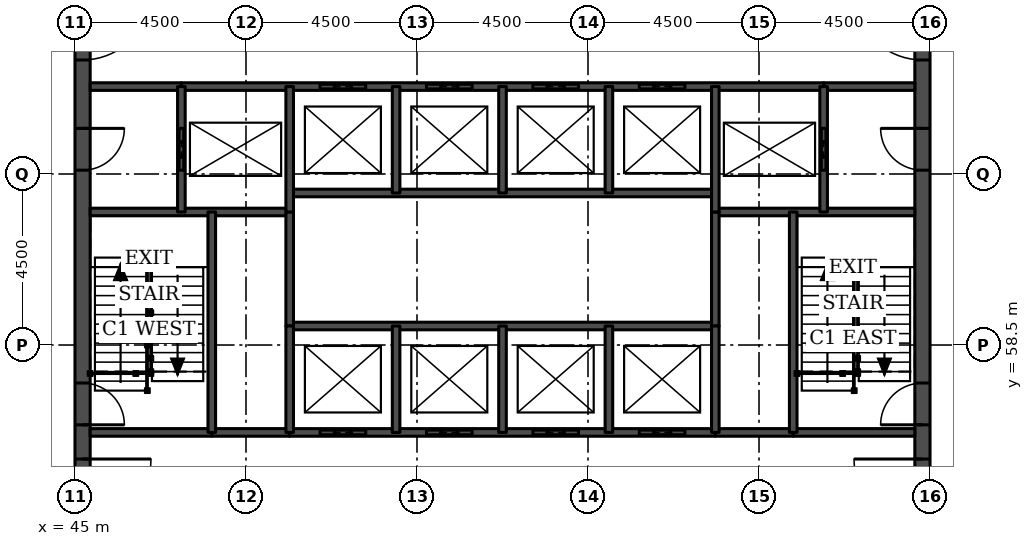
"""IFC4 building model, lengths in metres.
Left out: names, types, materials, properties, quantities, classifications, styles, units other than length and angle.
Written with IfcOpenShell. Run it as: python <this file> out.ifc"""

import sys

from ifc_helpers import new_model, si_unit, direction, frame, frame_2d, origin, place, context, subcontext, project, spatial, rectangle, extrude, element, fill, save


model = new_model("IFC4")
c1 = context("Model", 3, precision=1e-05, world=origin(), true_north=direction((0.0, 1.0)))
c2 = subcontext(c1, "Body", "Model", "MODEL_VIEW")
j1 = project(units=[si_unit("LENGTHUNIT", "METRE"), si_unit("PLANEANGLEUNIT", "RADIAN")], contexts=[c1])
p1 = place(None, origin())
s1 = spatial("IfcSite", under=j1, at=p1, CompositionType="ELEMENT")
p2 = place(p1, origin())
s2 = spatial("IfcBuilding", under=s1, at=p2, CompositionType="ELEMENT")
p3 = place(p2, frame((0.0, 0.0, 223.0)))
s3 = spatial("IfcBuildingStorey", under=s2, at=p3, CompositionType="ELEMENT", Elevation=223.0)
p4 = place(p3, frame((45.2, 49.5, 0.0), z_axis=(0.0, 0.0, 1.0), x_axis=(0.0, 1.0, 0.0)))
e1 = element("IfcWall", 1, at=p4, inside=s3, PredefinedType="SHEAR", context=c2, shape_type="SweptSolid", body=[
    extrude(rectangle(XDim=22.5, YDim=0.4, at=frame_2d((11.25, 0.0))), origin(), (0.0, 0.0, 1.0), 3.7),
])
p5 = place(p4, frame((4.2, 0.0, 0.0)))
e2 = element("IfcOpeningElement", 2, at=p5, cuts=e1, PredefinedType="OPENING", context=c2, shape_type="SweptSolid", body=[
    extrude(rectangle(XDim=1.8, YDim=2.1, at=frame_2d((0.9, 1.05))), frame((0.0, 0.21, 0.0), z_axis=(0.0, -1.0, 0.0), x_axis=(1.0, 0.0, 0.0)), (0.0, 0.0, 1.0), 0.42),
])
p6 = place(p4, frame((6.9, 0.0, 0.0)))
e3 = element("IfcOpeningElement", 3, at=p6, cuts=e1, PredefinedType="OPENING", context=c2, shape_type="SweptSolid", body=[
    extrude(rectangle(XDim=1.1, YDim=2.1, at=frame_2d((0.55, 1.05))), frame((0.0, 0.21, 0.0), z_axis=(0.0, -1.0, 0.0), x_axis=(1.0, 0.0, 0.0)), (0.0, 0.0, 1.0), 0.42),
])
p7 = place(p4, frame((13.6, 0.0, 0.0)))
e4 = element("IfcOpeningElement", 4, at=p7, cuts=e1, PredefinedType="OPENING", context=c2, shape_type="SweptSolid", body=[
    extrude(rectangle(XDim=1.1, YDim=2.1, at=frame_2d((0.55, 1.05))), frame((0.0, 0.21, 0.0), z_axis=(0.0, -1.0, 0.0), x_axis=(1.0, 0.0, 0.0)), (0.0, 0.0, 1.0), 0.42),
])
p8 = place(p4, frame((16.5, 0.0, 0.0)))
e5 = element("IfcOpeningElement", 5, at=p8, cuts=e1, PredefinedType="OPENING", context=c2, shape_type="SweptSolid", body=[
    extrude(rectangle(XDim=1.8, YDim=2.1, at=frame_2d((0.9, 1.05))), frame((0.0, 0.21, 0.0), z_axis=(0.0, -1.0, 0.0), x_axis=(1.0, 0.0, 0.0)), (0.0, 0.0, 1.0), 0.42),
])
p9 = place(p3, frame((67.3, 49.5, 0.0), z_axis=(0.0, 0.0, 1.0), x_axis=(0.0, 1.0, 0.0)))
e6 = element("IfcWall", 6, at=p9, inside=s3, PredefinedType="SHEAR", context=c2, shape_type="SweptSolid", body=[
    extrude(rectangle(XDim=22.5, YDim=0.4, at=frame_2d((11.25, 0.0))), origin(), (0.0, 0.0, 1.0), 3.7),
])
p10 = place(p9, frame((4.2, 0.0, 0.0)))
e7 = element("IfcOpeningElement", 7, at=p10, cuts=e6, PredefinedType="OPENING", context=c2, shape_type="SweptSolid", body=[
    extrude(rectangle(XDim=1.8, YDim=2.1, at=frame_2d((0.9, 1.05))), frame((0.0, 0.21, 0.0), z_axis=(0.0, -1.0, 0.0), x_axis=(1.0, 0.0, 0.0)), (0.0, 0.0, 1.0), 0.42),
])
p11 = place(p9, frame((6.9, 0.0, 0.0)))
e8 = element("IfcOpeningElement", 8, at=p11, cuts=e6, PredefinedType="OPENING", context=c2, shape_type="SweptSolid", body=[
    extrude(rectangle(XDim=1.1, YDim=2.1, at=frame_2d((0.55, 1.05))), frame((0.0, 0.21, 0.0), z_axis=(0.0, -1.0, 0.0), x_axis=(1.0, 0.0, 0.0)), (0.0, 0.0, 1.0), 0.42),
])
p12 = place(p9, frame((13.6, 0.0, 0.0)))
e9 = element("IfcOpeningElement", 9, at=p12, cuts=e6, PredefinedType="OPENING", context=c2, shape_type="SweptSolid", body=[
    extrude(rectangle(XDim=1.1, YDim=2.1, at=frame_2d((0.55, 1.05))), frame((0.0, 0.21, 0.0), z_axis=(0.0, -1.0, 0.0), x_axis=(1.0, 0.0, 0.0)), (0.0, 0.0, 1.0), 0.42),
])
p13 = place(p9, frame((16.5, 0.0, 0.0)))
e10 = element("IfcOpeningElement", 10, at=p13, cuts=e6, PredefinedType="OPENING", context=c2, shape_type="SweptSolid", body=[
    extrude(rectangle(XDim=1.8, YDim=2.1, at=frame_2d((0.9, 1.05))), frame((0.0, 0.21, 0.0), z_axis=(0.0, -1.0, 0.0), x_axis=(1.0, 0.0, 0.0)), (0.0, 0.0, 1.0), 0.42),
])
for number, where, z_axis, x_axis in (
    (11, (48.6, 56.2, 0.0), (0.0, 0.0, 1.0), (1.0, 0.0, 0.0)),
    (12, (61.85, 56.2, 0.0), (0.0, 0.0, 1.0), (1.0, 0.0, 0.0)),
):
    element("IfcWall", number, at=place(p3, frame(where, z_axis=z_axis, x_axis=x_axis)), inside=s3, PredefinedType="SOLIDWALL", context=c2, shape_type="SweptSolid", body=[
        extrude(rectangle(XDim=2.05, YDim=0.2, at=frame_2d((1.025, 0.0))), origin(), (0.0, 0.0, 1.0), 3.55),
    ])
p14 = place(p3, frame((45.4, 56.2, 0.0), z_axis=(0.0, 0.0, 1.0), x_axis=(1.0, 0.0, 0.0)))
e13 = element("IfcWall", 13, at=p14, inside=s3, PredefinedType="SOLIDWALL", context=c2, shape_type="SweptSolid", body=[
    extrude(rectangle(XDim=3.2, YDim=0.2, at=frame_2d((1.6, 0.0))), origin(), (0.0, 0.0, 1.0), 3.55),
])
p15 = place(p3, frame((50.65, 56.2, 0.0), z_axis=(0.0, 0.0, 1.0), x_axis=(1.0, 0.0, 0.0)))
e14 = element("IfcWall", 14, at=p15, inside=s3, PredefinedType="SOLIDWALL", context=c2, shape_type="SweptSolid", body=[
    extrude(rectangle(XDim=11.2, YDim=0.2, at=frame_2d((5.6, 0.0))), origin(), (0.0, 0.0, 1.0), 3.55),
])
p16 = place(p15, frame((0.8, 0.0, 0.0)))
e15 = element("IfcOpeningElement", 15, at=p16, cuts=e14, PredefinedType="OPENING", context=c2, shape_type="SweptSolid", body=[
    extrude(rectangle(XDim=1.2, YDim=2.1, at=frame_2d((0.6, 1.05))), frame((0.0, 0.11, 0.0), z_axis=(0.0, -1.0, 0.0), x_axis=(1.0, 0.0, 0.0)), (0.0, 0.0, 1.0), 0.22),
])
p17 = place(p15, frame((3.6, 0.0, 0.0)))
e16 = element("IfcOpeningElement", 16, at=p17, cuts=e14, PredefinedType="OPENING", context=c2, shape_type="SweptSolid", body=[
    extrude(rectangle(XDim=1.2, YDim=2.1, at=frame_2d((0.6, 1.05))), frame((0.0, 0.11, 0.0), z_axis=(0.0, -1.0, 0.0), x_axis=(1.0, 0.0, 0.0)), (0.0, 0.0, 1.0), 0.22),
])
p18 = place(p15, frame((6.4, 0.0, 0.0)))
e17 = element("IfcOpeningElement", 17, at=p18, cuts=e14, PredefinedType="OPENING", context=c2, shape_type="SweptSolid", body=[
    extrude(rectangle(XDim=1.2, YDim=2.1, at=frame_2d((0.6, 1.05))), frame((0.0, 0.11, 0.0), z_axis=(0.0, -1.0, 0.0), x_axis=(1.0, 0.0, 0.0)), (0.0, 0.0, 1.0), 0.22),
])
p19 = place(p15, frame((9.2, 0.0, 0.0)))
e18 = element("IfcOpeningElement", 18, at=p19, cuts=e14, PredefinedType="OPENING", context=c2, shape_type="SweptSolid", body=[
    extrude(rectangle(XDim=1.2, YDim=2.1, at=frame_2d((0.6, 1.05))), frame((0.0, 0.11, 0.0), z_axis=(0.0, -1.0, 0.0), x_axis=(1.0, 0.0, 0.0)), (0.0, 0.0, 1.0), 0.22),
])
p20 = place(p3, frame((63.9, 56.2, 0.0), z_axis=(0.0, 0.0, 1.0), x_axis=(1.0, 0.0, 0.0)))
e19 = element("IfcWall", 19, at=p20, inside=s3, PredefinedType="SOLIDWALL", context=c2, shape_type="SweptSolid", body=[
    extrude(rectangle(XDim=3.2, YDim=0.2, at=frame_2d((1.6, 0.0))), origin(), (0.0, 0.0, 1.0), 3.55),
])
p21 = place(p3, frame((50.65, 59.0, 0.0), z_axis=(0.0, 0.0, 1.0), x_axis=(1.0, 0.0, 0.0)))
e20 = element("IfcWall", 20, at=p21, inside=s3, PredefinedType="SOLIDWALL", context=c2, shape_type="SweptSolid", body=[
    extrude(rectangle(XDim=11.2, YDim=0.2, at=frame_2d((5.6, 0.0))), origin(), (0.0, 0.0, 1.0), 3.7),
])
for number, where, z_axis, x_axis in (
    (21, (45.4, 62.0, 0.0), (0.0, 0.0, 1.0), (1.0, 0.0, 0.0)),
    (22, (61.85, 62.0, 0.0), (0.0, 0.0, 1.0), (1.0, 0.0, 0.0)),
):
    element("IfcWall", number, at=place(p3, frame(where, z_axis=z_axis, x_axis=x_axis)), inside=s3, PredefinedType="SOLIDWALL", context=c2, shape_type="SweptSolid", body=[
        extrude(rectangle(XDim=5.25, YDim=0.2, at=frame_2d((2.625, 0.0))), origin(), (0.0, 0.0, 1.0), 3.55),
    ])
p22 = place(p3, frame((50.65, 62.5, 0.0), z_axis=(0.0, 0.0, 1.0), x_axis=(1.0, 0.0, 0.0)))
e23 = element("IfcWall", 23, at=p22, inside=s3, PredefinedType="SOLIDWALL", context=c2, shape_type="SweptSolid", body=[
    extrude(rectangle(XDim=11.2, YDim=0.2, at=frame_2d((5.6, 0.0))), origin(), (0.0, 0.0, 1.0), 3.7),
])
for number, where, z_axis, x_axis in (
    (24, (45.4, 65.3, 0.0), (0.0, 0.0, 1.0), (1.0, 0.0, 0.0)),
    (25, (64.7, 65.3, 0.0), (0.0, 0.0, 1.0), (1.0, 0.0, 0.0)),
):
    element("IfcWall", number, at=place(p3, frame(where, z_axis=z_axis, x_axis=x_axis)), inside=s3, PredefinedType="SOLIDWALL", context=c2, shape_type="SweptSolid", body=[
        extrude(rectangle(XDim=2.4, YDim=0.2, at=frame_2d((1.2, 0.0))), origin(), (0.0, 0.0, 1.0), 3.55),
    ])
p23 = place(p3, frame((47.8, 65.3, 0.0), z_axis=(0.0, 0.0, 1.0), x_axis=(1.0, 0.0, 0.0)))
e26 = element("IfcWall", 26, at=p23, inside=s3, PredefinedType="SOLIDWALL", context=c2, shape_type="SweptSolid", body=[
    extrude(rectangle(XDim=16.9, YDim=0.2, at=frame_2d((8.45, 0.0))), origin(), (0.0, 0.0, 1.0), 3.55),
])
p24 = place(p23, frame((3.65, 0.0, 0.0)))
e27 = element("IfcOpeningElement", 27, at=p24, cuts=e26, PredefinedType="OPENING", context=c2, shape_type="SweptSolid", body=[
    extrude(rectangle(XDim=1.2, YDim=2.1, at=frame_2d((0.6, 1.05))), frame((0.0, 0.11, 0.0), z_axis=(0.0, -1.0, 0.0), x_axis=(1.0, 0.0, 0.0)), (0.0, 0.0, 1.0), 0.22),
])
p25 = place(p23, frame((6.45, 0.0, 0.0)))
e28 = element("IfcOpeningElement", 28, at=p25, cuts=e26, PredefinedType="OPENING", context=c2, shape_type="SweptSolid", body=[
    extrude(rectangle(XDim=1.2, YDim=2.1, at=frame_2d((0.6, 1.05))), frame((0.0, 0.11, 0.0), z_axis=(0.0, -1.0, 0.0), x_axis=(1.0, 0.0, 0.0)), (0.0, 0.0, 1.0), 0.22),
])
p26 = place(p23, frame((9.25, 0.0, 0.0)))
e29 = element("IfcOpeningElement", 29, at=p26, cuts=e26, PredefinedType="OPENING", context=c2, shape_type="SweptSolid", body=[
    extrude(rectangle(XDim=1.2, YDim=2.1, at=frame_2d((0.6, 1.05))), frame((0.0, 0.11, 0.0), z_axis=(0.0, -1.0, 0.0), x_axis=(1.0, 0.0, 0.0)), (0.0, 0.0, 1.0), 0.22),
])
p27 = place(p23, frame((12.05, 0.0, 0.0)))
e30 = element("IfcOpeningElement", 30, at=p27, cuts=e26, PredefinedType="OPENING", context=c2, shape_type="SweptSolid", body=[
    extrude(rectangle(XDim=1.2, YDim=2.1, at=frame_2d((0.6, 1.05))), frame((0.0, 0.11, 0.0), z_axis=(0.0, -1.0, 0.0), x_axis=(1.0, 0.0, 0.0)), (0.0, 0.0, 1.0), 0.22),
])
p28 = place(p3, frame((47.8, 62.0, 0.0), z_axis=(0.0, 0.0, 1.0), x_axis=(0.0, 1.0, 0.0)))
e31 = element("IfcWall", 31, at=p28, inside=s3, PredefinedType="SOLIDWALL", context=c2, shape_type="SweptSolid", body=[
    extrude(rectangle(XDim=3.3, YDim=0.2, at=frame_2d((1.65, 0.0))), origin(), (0.0, 0.0, 1.0), 3.55),
])
p29 = place(p28, frame((1.1, 0.0, 0.0)))
e32 = element("IfcOpeningElement", 32, at=p29, cuts=e31, PredefinedType="OPENING", context=c2, shape_type="SweptSolid", body=[
    extrude(rectangle(XDim=1.1, YDim=2.1, at=frame_2d((0.55, 1.05))), frame((0.0, 0.11, 0.0), z_axis=(0.0, -1.0, 0.0), x_axis=(1.0, 0.0, 0.0)), (0.0, 0.0, 1.0), 0.22),
])
p30 = place(p3, frame((48.6, 56.2, 0.0), z_axis=(0.0, 0.0, 1.0), x_axis=(0.0, 1.0, 0.0)))
e33 = element("IfcWall", 33, at=p30, inside=s3, PredefinedType="SOLIDWALL", context=c2, shape_type="SweptSolid", body=[
    extrude(rectangle(XDim=5.8, YDim=0.2, at=frame_2d((2.9, 0.0))), origin(), (0.0, 0.0, 1.0), 3.55),
])
p31 = place(p3, frame((50.65, 59.0, 0.0), z_axis=(0.0, 0.0, 1.0), x_axis=(0.0, 1.0, 0.0)))
e34 = element("IfcWall", 34, at=p31, inside=s3, PredefinedType="SOLIDWALL", context=c2, shape_type="SweptSolid", body=[
    extrude(rectangle(XDim=3.0, YDim=0.2, at=frame_2d((1.5, 0.0))), origin(), (0.0, 0.0, 1.0), 3.7),
])
p32 = place(p3, frame((50.65, 56.2, 0.0), z_axis=(0.0, 0.0, 1.0), x_axis=(0.0, 1.0, 0.0)))
e35 = element("IfcWall", 35, at=p32, inside=s3, PredefinedType="SOLIDWALL", context=c2, shape_type="SweptSolid", body=[
    extrude(rectangle(XDim=2.8, YDim=0.2, at=frame_2d((1.4, 0.0))), origin(), (0.0, 0.0, 1.0), 3.55),
])
p33 = place(p3, frame((50.65, 62.0, 0.0), z_axis=(0.0, 0.0, 1.0), x_axis=(0.0, 1.0, 0.0)))
e36 = element("IfcWall", 36, at=p33, inside=s3, PredefinedType="SOLIDWALL", context=c2, shape_type="SweptSolid", body=[
    extrude(rectangle(XDim=3.3, YDim=0.2, at=frame_2d((1.65, 0.0))), origin(), (0.0, 0.0, 1.0), 3.55),
])
for number, where, z_axis, x_axis in (
    (37, (53.45, 56.2, 0.0), (0.0, 0.0, 1.0), (0.0, 1.0, 0.0)),
    (38, (53.45, 62.5, 0.0), (0.0, 0.0, 1.0), (0.0, 1.0, 0.0)),
    (39, (56.25, 56.2, 0.0), (0.0, 0.0, 1.0), (0.0, 1.0, 0.0)),
    (40, (56.25, 62.5, 0.0), (0.0, 0.0, 1.0), (0.0, 1.0, 0.0)),
    (41, (59.05, 56.2, 0.0), (0.0, 0.0, 1.0), (0.0, 1.0, 0.0)),
    (42, (59.05, 62.5, 0.0), (0.0, 0.0, 1.0), (0.0, 1.0, 0.0)),
):
    element("IfcWall", number, at=place(p3, frame(where, z_axis=z_axis, x_axis=x_axis)), inside=s3, PredefinedType="SOLIDWALL", context=c2, shape_type="SweptSolid", body=[
        extrude(rectangle(XDim=2.8, YDim=0.2, at=frame_2d((1.4, 0.0))), origin(), (0.0, 0.0, 1.0), 3.55),
    ])
p34 = place(p3, frame((61.85, 59.0, 0.0), z_axis=(0.0, 0.0, 1.0), x_axis=(0.0, 1.0, 0.0)))
e43 = element("IfcWall", 43, at=p34, inside=s3, PredefinedType="SOLIDWALL", context=c2, shape_type="SweptSolid", body=[
    extrude(rectangle(XDim=3.0, YDim=0.2, at=frame_2d((1.5, 0.0))), origin(), (0.0, 0.0, 1.0), 3.7),
])
p35 = place(p3, frame((61.85, 56.2, 0.0), z_axis=(0.0, 0.0, 1.0), x_axis=(0.0, 1.0, 0.0)))
e44 = element("IfcWall", 44, at=p35, inside=s3, PredefinedType="SOLIDWALL", context=c2, shape_type="SweptSolid", body=[
    extrude(rectangle(XDim=2.8, YDim=0.2, at=frame_2d((1.4, 0.0))), origin(), (0.0, 0.0, 1.0), 3.55),
])
p36 = place(p3, frame((61.85, 62.0, 0.0), z_axis=(0.0, 0.0, 1.0), x_axis=(0.0, 1.0, 0.0)))
e45 = element("IfcWall", 45, at=p36, inside=s3, PredefinedType="SOLIDWALL", context=c2, shape_type="SweptSolid", body=[
    extrude(rectangle(XDim=3.3, YDim=0.2, at=frame_2d((1.65, 0.0))), origin(), (0.0, 0.0, 1.0), 3.55),
])
p37 = place(p3, frame((63.9, 56.2, 0.0), z_axis=(0.0, 0.0, 1.0), x_axis=(0.0, 1.0, 0.0)))
e46 = element("IfcWall", 46, at=p37, inside=s3, PredefinedType="SOLIDWALL", context=c2, shape_type="SweptSolid", body=[
    extrude(rectangle(XDim=5.8, YDim=0.2, at=frame_2d((2.9, 0.0))), origin(), (0.0, 0.0, 1.0), 3.55),
])
p38 = place(p3, frame((64.7, 62.0, 0.0), z_axis=(0.0, 0.0, 1.0), x_axis=(0.0, 1.0, 0.0)))
e47 = element("IfcWall", 47, at=p38, inside=s3, PredefinedType="SOLIDWALL", context=c2, shape_type="SweptSolid", body=[
    extrude(rectangle(XDim=3.3, YDim=0.2, at=frame_2d((1.65, 0.0))), origin(), (0.0, 0.0, 1.0), 3.55),
])
p39 = place(p38, frame((1.1, 0.0, 0.0)))
e48 = element("IfcOpeningElement", 48, at=p39, cuts=e47, PredefinedType="OPENING", context=c2, shape_type="SweptSolid", body=[
    extrude(rectangle(XDim=1.1, YDim=2.1, at=frame_2d((0.55, 1.05))), frame((0.0, 0.11, 0.0), z_axis=(0.0, -1.0, 0.0), x_axis=(1.0, 0.0, 0.0)), (0.0, 0.0, 1.0), 0.22),
])
p40 = place(p16, origin())
e49 = element("IfcDoor", 49, at=p40, inside=s3, OperationType="DOUBLE_DOOR_SLIDING", PredefinedType="DOOR", context=c2, shape_type="SweptSolid", body=[
    extrude(rectangle(XDim=1.2, YDim=2.1, at=frame_2d((0.6, 1.05))), frame((0.0, 0.025, 0.0), z_axis=(0.0, -1.0, 0.0), x_axis=(1.0, 0.0, 0.0)), (0.0, 0.0, 1.0), 0.05),
])
fill(e15, e49)
p41 = place(p17, origin())
e50 = element("IfcDoor", 50, at=p41, inside=s3, OperationType="DOUBLE_DOOR_SLIDING", PredefinedType="DOOR", context=c2, shape_type="SweptSolid", body=[
    extrude(rectangle(XDim=1.2, YDim=2.1, at=frame_2d((0.6, 1.05))), frame((0.0, 0.025, 0.0), z_axis=(0.0, -1.0, 0.0), x_axis=(1.0, 0.0, 0.0)), (0.0, 0.0, 1.0), 0.05),
])
fill(e16, e50)
p42 = place(p18, origin())
e51 = element("IfcDoor", 51, at=p42, inside=s3, OperationType="DOUBLE_DOOR_SLIDING", PredefinedType="DOOR", context=c2, shape_type="SweptSolid", body=[
    extrude(rectangle(XDim=1.2, YDim=2.1, at=frame_2d((0.6, 1.05))), frame((0.0, 0.025, 0.0), z_axis=(0.0, -1.0, 0.0), x_axis=(1.0, 0.0, 0.0)), (0.0, 0.0, 1.0), 0.05),
])
fill(e17, e51)
p43 = place(p19, origin())
e52 = element("IfcDoor", 52, at=p43, inside=s3, OperationType="DOUBLE_DOOR_SLIDING", PredefinedType="DOOR", context=c2, shape_type="SweptSolid", body=[
    extrude(rectangle(XDim=1.2, YDim=2.1, at=frame_2d((0.6, 1.05))), frame((0.0, 0.025, 0.0), z_axis=(0.0, -1.0, 0.0), x_axis=(1.0, 0.0, 0.0)), (0.0, 0.0, 1.0), 0.05),
])
fill(e18, e52)
p44 = place(p24, origin())
e53 = element("IfcDoor", 53, at=p44, inside=s3, OperationType="DOUBLE_DOOR_SLIDING", PredefinedType="DOOR", context=c2, shape_type="SweptSolid", body=[
    extrude(rectangle(XDim=1.2, YDim=2.1, at=frame_2d((0.6, 1.05))), frame((0.0, 0.025, 0.0), z_axis=(0.0, -1.0, 0.0), x_axis=(1.0, 0.0, 0.0)), (0.0, 0.0, 1.0), 0.05),
])
fill(e27, e53)
p45 = place(p25, origin())
e54 = element("IfcDoor", 54, at=p45, inside=s3, OperationType="DOUBLE_DOOR_SLIDING", PredefinedType="DOOR", context=c2, shape_type="SweptSolid", body=[
    extrude(rectangle(XDim=1.2, YDim=2.1, at=frame_2d((0.6, 1.05))), frame((0.0, 0.025, 0.0), z_axis=(0.0, -1.0, 0.0), x_axis=(1.0, 0.0, 0.0)), (0.0, 0.0, 1.0), 0.05),
])
fill(e28, e54)
p46 = place(p26, origin())
e55 = element("IfcDoor", 55, at=p46, inside=s3, OperationType="DOUBLE_DOOR_SLIDING", PredefinedType="DOOR", context=c2, shape_type="SweptSolid", body=[
    extrude(rectangle(XDim=1.2, YDim=2.1, at=frame_2d((0.6, 1.05))), frame((0.0, 0.025, 0.0), z_axis=(0.0, -1.0, 0.0), x_axis=(1.0, 0.0, 0.0)), (0.0, 0.0, 1.0), 0.05),
])
fill(e29, e55)
p47 = place(p27, origin())
e56 = element("IfcDoor", 56, at=p47, inside=s3, OperationType="DOUBLE_DOOR_SLIDING", PredefinedType="DOOR", context=c2, shape_type="SweptSolid", body=[
    extrude(rectangle(XDim=1.2, YDim=2.1, at=frame_2d((0.6, 1.05))), frame((0.0, 0.025, 0.0), z_axis=(0.0, -1.0, 0.0), x_axis=(1.0, 0.0, 0.0)), (0.0, 0.0, 1.0), 0.05),
])
fill(e30, e56)
p48 = place(p29, origin())
e57 = element("IfcDoor", 57, at=p48, inside=s3, OperationType="DOUBLE_DOOR_SLIDING", PredefinedType="DOOR", context=c2, shape_type="SweptSolid", body=[
    extrude(rectangle(XDim=1.1, YDim=2.1, at=frame_2d((0.55, 1.05))), frame((0.0, 0.025, 0.0), z_axis=(0.0, -1.0, 0.0), x_axis=(1.0, 0.0, 0.0)), (0.0, 0.0, 1.0), 0.05),
])
fill(e32, e57)
p49 = place(p39, origin())
e58 = element("IfcDoor", 58, at=p49, inside=s3, OperationType="DOUBLE_DOOR_SLIDING", PredefinedType="DOOR", context=c2, shape_type="SweptSolid", body=[
    extrude(rectangle(XDim=1.1, YDim=2.1, at=frame_2d((0.55, 1.05))), frame((0.0, 0.025, 0.0), z_axis=(0.0, -1.0, 0.0), x_axis=(1.0, 0.0, 0.0)), (0.0, 0.0, 1.0), 0.05),
])
fill(e48, e58)
p50 = place(p5, frame((1.8, 0.0, 0.0), z_axis=(0.0, 0.0, 1.0), x_axis=(-1.0, 0.0, 0.0)))
e59 = element("IfcDoor", 59, at=p50, inside=s3, OperationType="SINGLE_SWING_LEFT", PredefinedType="DOOR", context=c2, shape_type="SweptSolid", body=[
    extrude(rectangle(XDim=1.8, YDim=2.1, at=frame_2d((0.9, 1.05))), frame((0.0, 0.025, 0.0), z_axis=(0.0, -1.0, 0.0), x_axis=(1.0, 0.0, 0.0)), (0.0, 0.0, 1.0), 0.05),
])
fill(e2, e59)
p51 = place(p6, frame((1.1, 0.0, 0.0), z_axis=(0.0, 0.0, 1.0), x_axis=(-1.0, 0.0, 0.0)))
e60 = element("IfcDoor", 60, at=p51, inside=s3, OperationType="SINGLE_SWING_RIGHT", PredefinedType="DOOR", context=c2, shape_type="SweptSolid", body=[
    extrude(rectangle(XDim=1.1, YDim=2.1, at=frame_2d((0.55, 1.05))), frame((0.0, 0.025, 0.0), z_axis=(0.0, -1.0, 0.0), x_axis=(1.0, 0.0, 0.0)), (0.0, 0.0, 1.0), 0.05),
])
fill(e3, e60)
p52 = place(p7, frame((1.1, 0.0, 0.0), z_axis=(0.0, 0.0, 1.0), x_axis=(-1.0, 0.0, 0.0)))
e61 = element("IfcDoor", 61, at=p52, inside=s3, OperationType="SINGLE_SWING_LEFT", PredefinedType="DOOR", context=c2, shape_type="SweptSolid", body=[
    extrude(rectangle(XDim=1.1, YDim=2.1, at=frame_2d((0.55, 1.05))), frame((0.0, 0.025, 0.0), z_axis=(0.0, -1.0, 0.0), x_axis=(1.0, 0.0, 0.0)), (0.0, 0.0, 1.0), 0.05),
])
fill(e4, e61)
p53 = place(p8, frame((1.8, 0.0, 0.0), z_axis=(0.0, 0.0, 1.0), x_axis=(-1.0, 0.0, 0.0)))
e62 = element("IfcDoor", 62, at=p53, inside=s3, OperationType="SINGLE_SWING_LEFT", PredefinedType="DOOR", context=c2, shape_type="SweptSolid", body=[
    extrude(rectangle(XDim=1.8, YDim=2.1, at=frame_2d((0.9, 1.05))), frame((0.0, 0.025, 0.0), z_axis=(0.0, -1.0, 0.0), x_axis=(1.0, 0.0, 0.0)), (0.0, 0.0, 1.0), 0.05),
])
fill(e5, e62)
p54 = place(p10, origin())
e63 = element("IfcDoor", 63, at=p54, inside=s3, OperationType="SINGLE_SWING_RIGHT", PredefinedType="DOOR", context=c2, shape_type="SweptSolid", body=[
    extrude(rectangle(XDim=1.8, YDim=2.1, at=frame_2d((0.9, 1.05))), frame((0.0, 0.025, 0.0), z_axis=(0.0, -1.0, 0.0), x_axis=(1.0, 0.0, 0.0)), (0.0, 0.0, 1.0), 0.05),
])
fill(e7, e63)
p55 = place(p11, origin())
e64 = element("IfcDoor", 64, at=p55, inside=s3, OperationType="SINGLE_SWING_LEFT", PredefinedType="DOOR", context=c2, shape_type="SweptSolid", body=[
    extrude(rectangle(XDim=1.1, YDim=2.1, at=frame_2d((0.55, 1.05))), frame((0.0, 0.025, 0.0), z_axis=(0.0, -1.0, 0.0), x_axis=(1.0, 0.0, 0.0)), (0.0, 0.0, 1.0), 0.05),
])
fill(e8, e64)
p56 = place(p12, origin())
e65 = element("IfcDoor", 65, at=p56, inside=s3, OperationType="SINGLE_SWING_RIGHT", PredefinedType="DOOR", context=c2, shape_type="SweptSolid", body=[
    extrude(rectangle(XDim=1.1, YDim=2.1, at=frame_2d((0.55, 1.05))), frame((0.0, 0.025, 0.0), z_axis=(0.0, -1.0, 0.0), x_axis=(1.0, 0.0, 0.0)), (0.0, 0.0, 1.0), 0.05),
])
fill(e9, e65)
p57 = place(p13, origin())
e66 = element("IfcDoor", 66, at=p57, inside=s3, OperationType="SINGLE_SWING_RIGHT", PredefinedType="DOOR", context=c2, shape_type="SweptSolid", body=[
    extrude(rectangle(XDim=1.8, YDim=2.1, at=frame_2d((0.9, 1.05))), frame((0.0, 0.025, 0.0), z_axis=(0.0, -1.0, 0.0), x_axis=(1.0, 0.0, 0.0)), (0.0, 0.0, 1.0), 0.05),
])
fill(e10, e66)
save(model, sys.argv[1])
